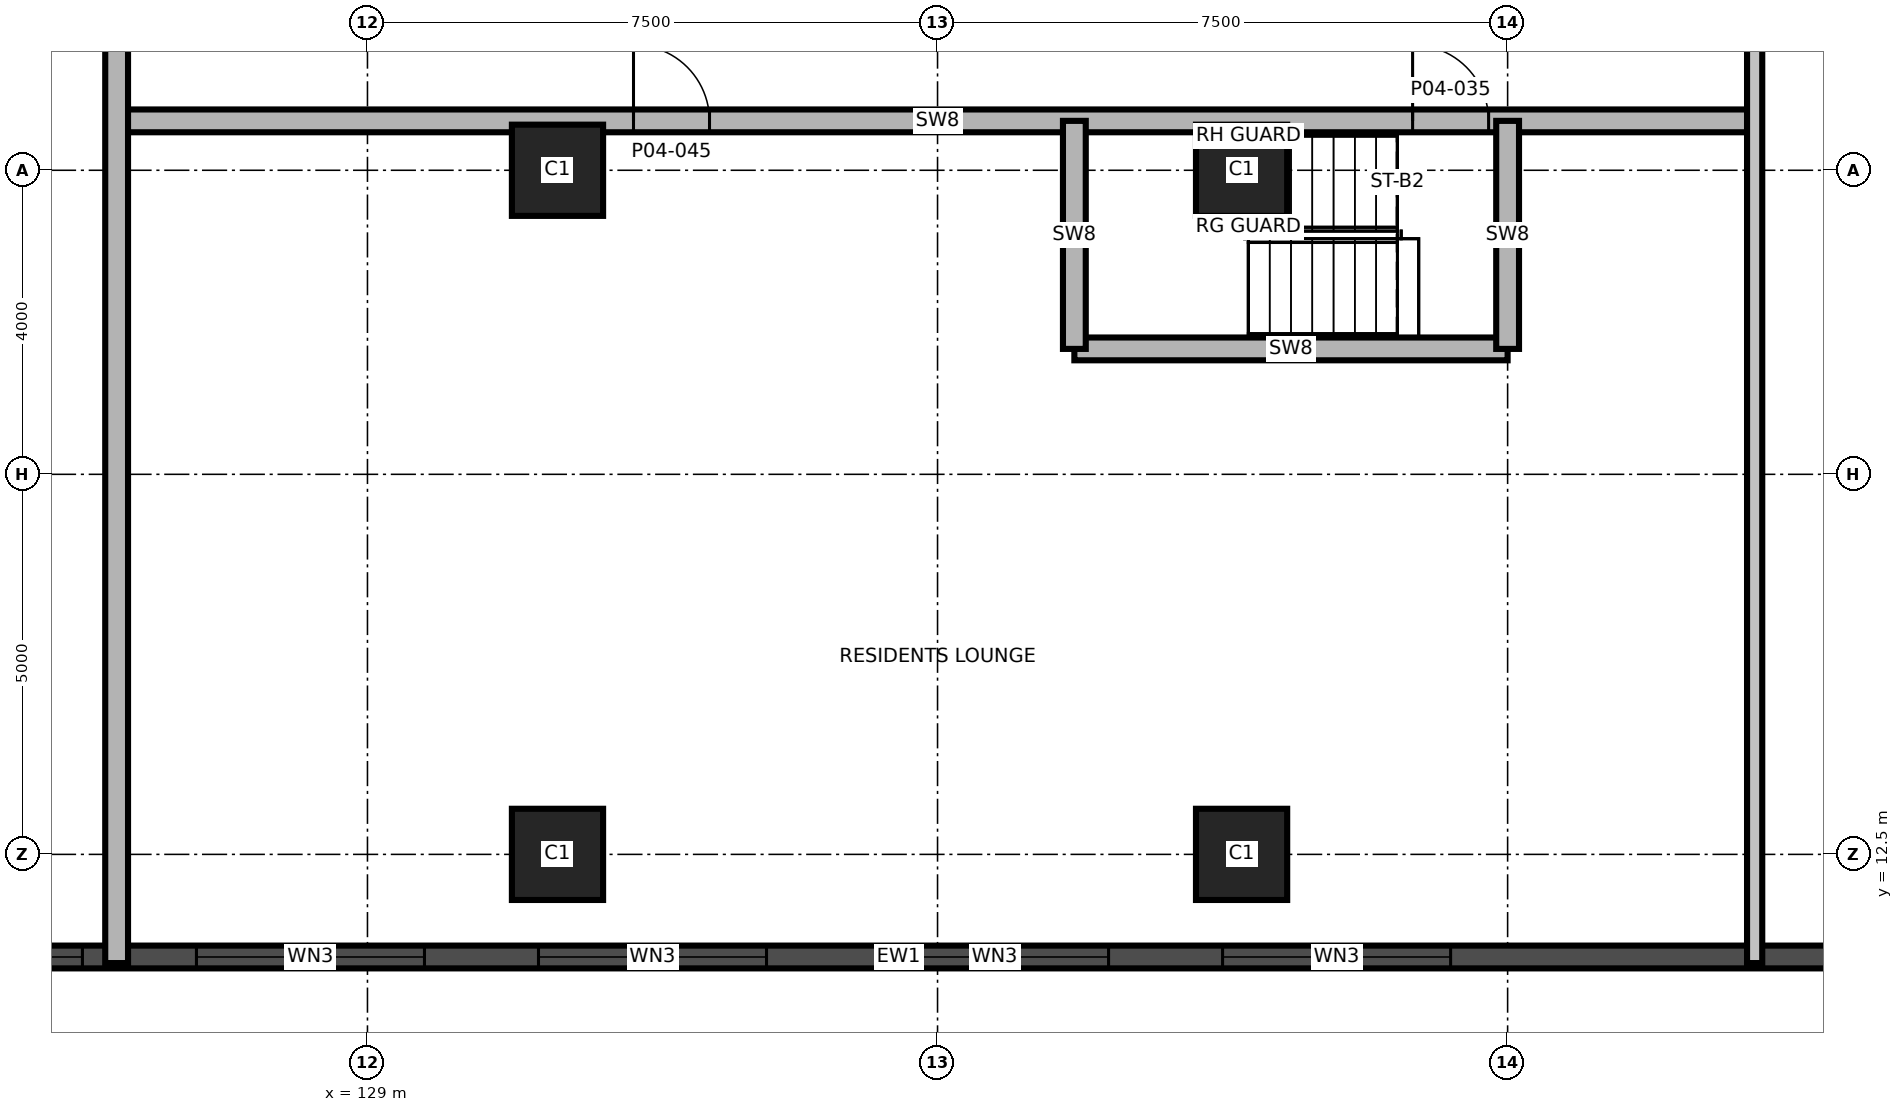
"""IFC4 building model, lengths in metres.
Left out: names, types, materials, properties, quantities, classifications, styles, units other than length and angle.
Written with IfcOpenShell. Run it as: python <this file> out.ifc"""

import sys

from ifc_helpers import new_model, si_unit, direction, frame, frame_2d, origin, origin_2d, place, context, subcontext, project, spatial, rectangle, extrude, element, fill, save


model = new_model("IFC4")
c1 = context("Model", 3, precision=1e-05, world=origin(), true_north=direction((0.0, 1.0)))
c2 = subcontext(c1, "Body", "Model", "MODEL_VIEW")
j1 = project(units=[si_unit("LENGTHUNIT", "METRE"), si_unit("PLANEANGLEUNIT", "RADIAN")], contexts=[c1])
p1 = place(None, origin())
s1 = spatial("IfcSite", under=j1, at=p1, CompositionType="ELEMENT")
p2 = place(p1, origin())
s2 = spatial("IfcBuilding", under=s1, at=p2, CompositionType="ELEMENT")
p3 = place(p2, frame((0.0, 0.0, 23.5)))
s3 = spatial("IfcBuildingStorey", under=s2, at=p3, CompositionType="ELEMENT", Elevation=23.5)
for number, where, z_axis, x_axis in (
    (1, (131.5, 12.5, 0.0), (0.0, 0.0, 1.0), (1.0, 0.0, 0.0)),
    (2, (140.5, 12.5, 0.0), (0.0, 0.0, 1.0), (1.0, 0.0, 0.0)),
    (3, (131.5, 21.5, 0.0), (0.0, 0.0, 1.0), (1.0, 0.0, 0.0)),
    (4, (140.5, 21.5, 0.0), (0.0, 0.0, 1.0), (1.0, 0.0, 0.0)),
):
    element("IfcColumn", number, at=place(p3, frame(where, z_axis=z_axis, x_axis=x_axis)), inside=s3, PredefinedType="COLUMN", context=c2, shape_type="SweptSolid", body=[
        extrude(rectangle(XDim=1.2, YDim=1.2, at=origin_2d()), origin(), (0.0, 0.0, 1.0), 5.0),
    ])
p4 = place(p3, frame((118.048, 11.15, 0.0), z_axis=(0.0, 0.0, 1.0), x_axis=(1.0, 0.0, 0.0)))
e5 = element("IfcWall", 5, at=p4, inside=s3, PredefinedType="SOLIDWALL", context=c2, shape_type="SweptSolid", body=[
    extrude(rectangle(XDim=35.88, YDim=0.3, at=frame_2d((17.94, 0.0))), origin(), (0.0, 0.0, 1.0), 4.7),
])
p5 = place(p4, frame((4.202, 0.0, 0.9)))
e6 = element("IfcOpeningElement", 6, at=p5, cuts=e5, PredefinedType="OPENING", context=c2, shape_type="SweptSolid", body=[
    extrude(rectangle(XDim=3.0, YDim=2.4, at=frame_2d((1.5, 1.2))), frame((0.0, 0.16, 0.0), z_axis=(0.0, -1.0, 0.0), x_axis=(1.0, 0.0, 0.0)), (0.0, 0.0, 1.0), 0.32),
])
p6 = place(p4, frame((8.702, 0.0, 0.9)))
e7 = element("IfcOpeningElement", 7, at=p6, cuts=e5, PredefinedType="OPENING", context=c2, shape_type="SweptSolid", body=[
    extrude(rectangle(XDim=3.0, YDim=2.4, at=frame_2d((1.5, 1.2))), frame((0.0, 0.16, 0.0), z_axis=(0.0, -1.0, 0.0), x_axis=(1.0, 0.0, 0.0)), (0.0, 0.0, 1.0), 0.32),
])
p7 = place(p4, frame((13.202, 0.0, 0.9)))
e8 = element("IfcOpeningElement", 8, at=p7, cuts=e5, PredefinedType="OPENING", context=c2, shape_type="SweptSolid", body=[
    extrude(rectangle(XDim=3.0, YDim=2.4, at=frame_2d((1.5, 1.2))), frame((0.0, 0.16, 0.0), z_axis=(0.0, -1.0, 0.0), x_axis=(1.0, 0.0, 0.0)), (0.0, 0.0, 1.0), 0.32),
])
p8 = place(p4, frame((17.702, 0.0, 0.9)))
e9 = element("IfcOpeningElement", 9, at=p8, cuts=e5, PredefinedType="OPENING", context=c2, shape_type="SweptSolid", body=[
    extrude(rectangle(XDim=3.0, YDim=2.4, at=frame_2d((1.5, 1.2))), frame((0.0, 0.16, 0.0), z_axis=(0.0, -1.0, 0.0), x_axis=(1.0, 0.0, 0.0)), (0.0, 0.0, 1.0), 0.32),
])
p9 = place(p4, frame((22.202, 0.0, 0.9)))
e10 = element("IfcOpeningElement", 10, at=p9, cuts=e5, PredefinedType="OPENING", context=c2, shape_type="SweptSolid", body=[
    extrude(rectangle(XDim=3.0, YDim=2.4, at=frame_2d((1.5, 1.2))), frame((0.0, 0.16, 0.0), z_axis=(0.0, -1.0, 0.0), x_axis=(1.0, 0.0, 0.0)), (0.0, 0.0, 1.0), 0.32),
])
p10 = place(p4, frame((31.726, 0.0, 0.9)))
e11 = element("IfcOpeningElement", 11, at=p10, cuts=e5, PredefinedType="OPENING", context=c2, shape_type="SweptSolid", body=[
    extrude(rectangle(XDim=3.0, YDim=2.4, at=frame_2d((1.5, 1.2))), frame((0.0, 0.16, 0.0), z_axis=(0.0, -1.0, 0.0), x_axis=(1.0, 0.0, 0.0)), (0.0, 0.0, 1.0), 0.32),
])
p11 = place(p3, frame((138.3, 19.15, 0.0), z_axis=(0.0, 0.0, 1.0), x_axis=(1.0, 0.0, 0.0)))
e12 = element("IfcWall", 12, at=p11, inside=s3, PredefinedType="SHEAR", context=c2, shape_type="SweptSolid", body=[
    extrude(rectangle(XDim=5.7, YDim=0.3, at=frame_2d((2.85, 0.0))), origin(), (0.0, 0.0, 1.0), 4.7),
])
p12 = place(p3, frame((125.75, 22.15, 0.0), z_axis=(0.0, 0.0, 1.0), x_axis=(1.0, 0.0, 0.0)))
e13 = element("IfcWall", 13, at=p12, inside=s3, PredefinedType="SHEAR", context=c2, shape_type="SweptSolid", body=[
    extrude(rectangle(XDim=21.5, YDim=0.3, at=frame_2d((10.75, 0.0))), origin(), (0.0, 0.0, 1.0), 4.7),
])
p13 = place(p12, frame((17.0, 0.0, 0.0)))
e14 = element("IfcOpeningElement", 14, at=p13, cuts=e13, PredefinedType="OPENING", context=c2, shape_type="SweptSolid", body=[
    extrude(rectangle(XDim=1.0, YDim=2.1, at=frame_2d((0.5, 1.05))), frame((0.0, 0.16, 0.0), z_axis=(0.0, -1.0, 0.0), x_axis=(1.0, 0.0, 0.0)), (0.0, 0.0, 1.0), 0.32),
])
p14 = place(p12, frame((6.75, 0.0, 0.0)))
e15 = element("IfcOpeningElement", 15, at=p14, cuts=e13, PredefinedType="OPENING", context=c2, shape_type="SweptSolid", body=[
    extrude(rectangle(XDim=1.0, YDim=2.1, at=frame_2d((0.5, 1.05))), frame((0.0, 0.16, 0.0), z_axis=(0.0, -1.0, 0.0), x_axis=(1.0, 0.0, 0.0)), (0.0, 0.0, 1.0), 0.32),
])
p15 = place(p3, frame((125.7, 11.07, 0.0), z_axis=(0.0, 0.0, 1.0), x_axis=(0.0, 1.0, 0.0)))
e16 = element("IfcWall", 16, at=p15, inside=s3, PredefinedType="SHEAR", context=c2, shape_type="SweptSolid", body=[
    extrude(rectangle(XDim=38.86, YDim=0.3, at=frame_2d((19.43, 0.0))), origin(), (0.0, 0.0, 1.0), 4.7),
])
p16 = place(p15, frame((24.73, 0.0, 0.0)))
e17 = element("IfcOpeningElement", 17, at=p16, cuts=e16, PredefinedType="OPENING", context=c2, shape_type="SweptSolid", body=[
    extrude(rectangle(XDim=1.2, YDim=2.1, at=frame_2d((0.6, 1.05))), frame((0.0, 0.16, 0.0), z_axis=(0.0, -1.0, 0.0), x_axis=(1.0, 0.0, 0.0)), (0.0, 0.0, 1.0), 0.32),
])
for number, where, z_axis, x_axis in (
    (18, (138.3, 19.15, 0.0), (0.0, 0.0, 1.0), (0.0, 1.0, 0.0)),
    (19, (144.0, 19.15, 0.0), (0.0, 0.0, 1.0), (0.0, 1.0, 0.0)),
):
    element("IfcWall", number, at=place(p3, frame(where, z_axis=z_axis, x_axis=x_axis)), inside=s3, PredefinedType="SHEAR", context=c2, shape_type="SweptSolid", body=[
        extrude(rectangle(XDim=3.0, YDim=0.3, at=frame_2d((1.5, 0.0))), origin(), (0.0, 0.0, 1.0), 4.7),
    ])
p17 = place(p3, frame((147.25, 11.07, 0.0), z_axis=(0.0, 0.0, 1.0), x_axis=(0.0, 1.0, 0.0)))
e20 = element("IfcWall", 20, at=p17, inside=s3, PredefinedType="PARTITIONING", context=c2, shape_type="SweptSolid", body=[
    extrude(rectangle(XDim=38.86, YDim=0.2, at=frame_2d((19.43, 0.0))), origin(), (0.0, 0.0, 1.0), 4.7),
])
p18 = place(p17, frame((18.18, 0.0, 0.0)))
e21 = element("IfcOpeningElement", 21, at=p18, cuts=e20, PredefinedType="OPENING", context=c2, shape_type="SweptSolid", body=[
    extrude(rectangle(XDim=1.5, YDim=2.1, at=frame_2d((0.75, 1.05))), frame((0.0, 0.11, 0.0), z_axis=(0.0, -1.0, 0.0), x_axis=(1.0, 0.0, 0.0)), (0.0, 0.0, 1.0), 0.22),
])
p19 = place(p5, origin())
e22 = element("IfcWindow", 22, at=p19, inside=s3, PartitioningType="SINGLE_PANEL", PredefinedType="WINDOW", context=c2, shape_type="SweptSolid", body=[
    extrude(rectangle(XDim=3.0, YDim=2.4, at=frame_2d((1.5, 1.2))), frame((0.0, 0.03, 0.0), z_axis=(0.0, -1.0, 0.0), x_axis=(1.0, 0.0, 0.0)), (0.0, 0.0, 1.0), 0.06),
])
fill(e6, e22)
p20 = place(p6, origin())
e23 = element("IfcWindow", 23, at=p20, inside=s3, PartitioningType="SINGLE_PANEL", PredefinedType="WINDOW", context=c2, shape_type="SweptSolid", body=[
    extrude(rectangle(XDim=3.0, YDim=2.4, at=frame_2d((1.5, 1.2))), frame((0.0, 0.03, 0.0), z_axis=(0.0, -1.0, 0.0), x_axis=(1.0, 0.0, 0.0)), (0.0, 0.0, 1.0), 0.06),
])
fill(e7, e23)
p21 = place(p7, origin())
e24 = element("IfcWindow", 24, at=p21, inside=s3, PartitioningType="SINGLE_PANEL", PredefinedType="WINDOW", context=c2, shape_type="SweptSolid", body=[
    extrude(rectangle(XDim=3.0, YDim=2.4, at=frame_2d((1.5, 1.2))), frame((0.0, 0.03, 0.0), z_axis=(0.0, -1.0, 0.0), x_axis=(1.0, 0.0, 0.0)), (0.0, 0.0, 1.0), 0.06),
])
fill(e8, e24)
p22 = place(p8, origin())
e25 = element("IfcWindow", 25, at=p22, inside=s3, PartitioningType="SINGLE_PANEL", PredefinedType="WINDOW", context=c2, shape_type="SweptSolid", body=[
    extrude(rectangle(XDim=3.0, YDim=2.4, at=frame_2d((1.5, 1.2))), frame((0.0, 0.03, 0.0), z_axis=(0.0, -1.0, 0.0), x_axis=(1.0, 0.0, 0.0)), (0.0, 0.0, 1.0), 0.06),
])
fill(e9, e25)
p23 = place(p9, origin())
e26 = element("IfcWindow", 26, at=p23, inside=s3, PartitioningType="SINGLE_PANEL", PredefinedType="WINDOW", context=c2, shape_type="SweptSolid", body=[
    extrude(rectangle(XDim=3.0, YDim=2.4, at=frame_2d((1.5, 1.2))), frame((0.0, 0.03, 0.0), z_axis=(0.0, -1.0, 0.0), x_axis=(1.0, 0.0, 0.0)), (0.0, 0.0, 1.0), 0.06),
])
fill(e10, e26)
p24 = place(p13, origin())
e27 = element("IfcDoor", 27, at=p24, inside=s3, OperationType="SINGLE_SWING_LEFT", PredefinedType="DOOR", context=c2, shape_type="SweptSolid", body=[
    extrude(rectangle(XDim=1.0, YDim=2.1, at=frame_2d((0.5, 1.05))), frame((0.0, 0.025, 0.0), z_axis=(0.0, -1.0, 0.0), x_axis=(1.0, 0.0, 0.0)), (0.0, 0.0, 1.0), 0.05),
])
fill(e14, e27)
p25 = place(p14, origin())
e28 = element("IfcDoor", 28, at=p25, inside=s3, OperationType="SINGLE_SWING_LEFT", PredefinedType="DOOR", context=c2, shape_type="SweptSolid", body=[
    extrude(rectangle(XDim=1.0, YDim=2.1, at=frame_2d((0.5, 1.05))), frame((0.0, 0.025, 0.0), z_axis=(0.0, -1.0, 0.0), x_axis=(1.0, 0.0, 0.0)), (0.0, 0.0, 1.0), 0.05),
])
fill(e15, e28)
save(model, sys.argv[1])
